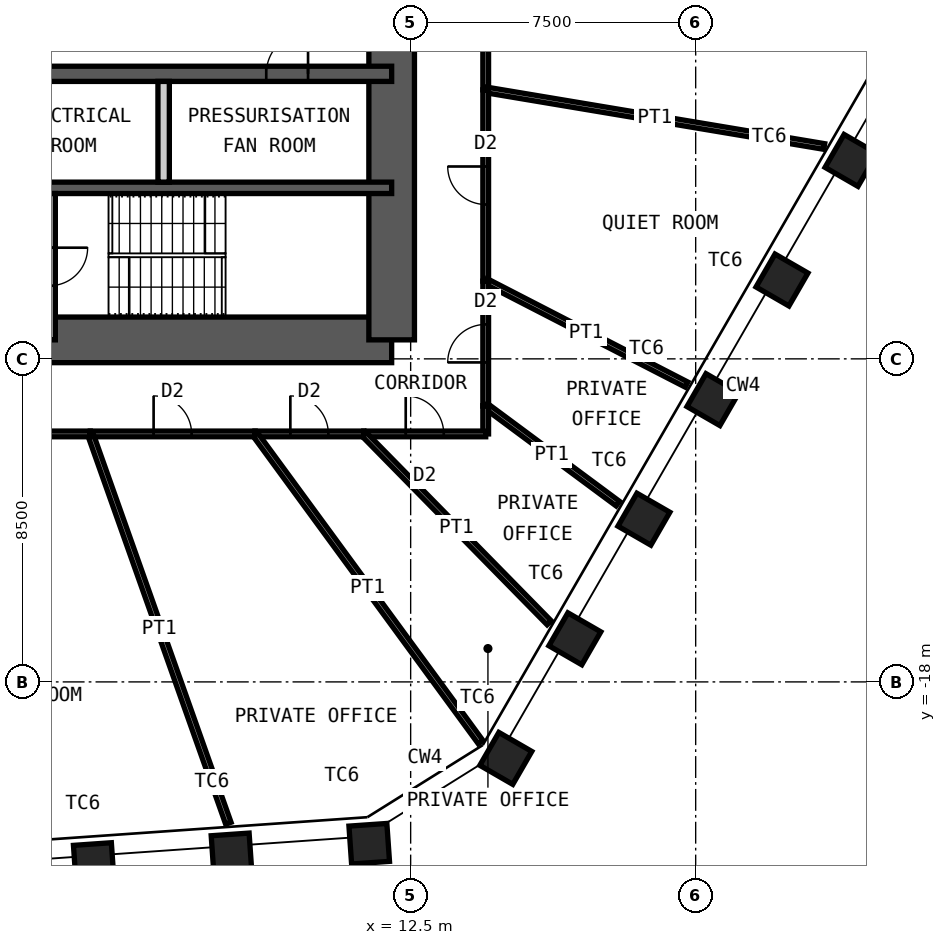
"""IFC4 building model, lengths in metres.
Left out: names, types, materials, properties, quantities, classifications, styles, units other than length and angle.
Written with IfcOpenShell. Run it as: python <this file> out.ifc"""

import sys

from ifc_helpers import new_model, si_unit, direction, frame, frame_2d, origin, origin_2d, place, context, subcontext, project, spatial, rectangle, hollow_rectangle, extrude, element, fill, save


model = new_model("IFC4")
c1 = context("Model", 3, precision=1e-05, world=origin(), true_north=direction((0.0, 1.0)))
c2 = subcontext(c1, "Body", "Model", "MODEL_VIEW")
j1 = project(units=[si_unit("LENGTHUNIT", "METRE"), si_unit("PLANEANGLEUNIT", "RADIAN")], contexts=[c1])
p1 = place(None, origin())
s1 = spatial("IfcSite", under=j1, at=p1, CompositionType="ELEMENT")
p2 = place(p1, origin())
s2 = spatial("IfcBuilding", under=s1, at=p2, CompositionType="ELEMENT")
p3 = place(p2, frame((0.0, 0.0, 243.4)))
s3 = spatial("IfcBuildingStorey", under=s2, at=p3, CompositionType="ELEMENT", Elevation=243.4)
for number, where, z_axis, x_axis in (
    (1, (24.088, -4.279, 0.0), (0.0, 0.0, 1.0), (0.5, 0.866, 0.0)),
    (2, (22.271, -7.426, 0.0), (0.0, 0.0, 1.0), (0.5, 0.866, 0.0)),
    (3, (20.454, -10.572, 0.0), (0.0, 0.0, 1.0), (0.5, 0.866, 0.0)),
    (4, (18.637, -13.719, 0.0), (0.0, 0.0, 1.0), (0.5, 0.866, 0.0)),
    (5, (16.821, -16.866, 0.0), (0.0, 0.0, 1.0), (0.5, 0.866, 0.0)),
    (6, (15.004, -20.012, 0.0), (0.0, 0.0, 1.0), (0.5, 0.866, 0.0)),
    (7, (11.41, -22.258, 0.0), (0.0, 0.0, 1.0), (0.998, 0.07, 0.0)),
    (8, (7.785, -22.512, 0.0), (0.0, 0.0, 1.0), (0.998, 0.07, 0.0)),
    (9, (4.16, -22.765, 0.0), (0.0, 0.0, 1.0), (0.998, 0.07, 0.0)),
):
    element("IfcColumn", number, at=place(p3, frame(where, z_axis=z_axis, x_axis=x_axis)), inside=s3, PredefinedType="COLUMN", context=c2, shape_type="SweptSolid", body=[
        extrude(hollow_rectangle(XDim=1.0, YDim=1.0, WallThickness=0.06, at=origin_2d()), origin(), (0.0, 0.0, 1.0), 4.2),
    ])
p4 = place(p3, frame((-12.0, -9.0, 0.0), z_axis=(0.0, 0.0, 1.0), x_axis=(1.0, 0.0, 0.0)))
e10 = element("IfcWall", 10, at=p4, inside=s3, PredefinedType="SHEAR", context=c2, shape_type="SweptSolid", body=[
    extrude(rectangle(XDim=24.0, YDim=1.2, at=frame_2d((12.0, 0.0))), origin(), (0.0, 0.0, 1.0), 4.2),
])
p5 = place(p4, frame((1.35, 0.0, 0.0)))
e11 = element("IfcOpeningElement", 11, at=p5, cuts=e10, PredefinedType="OPENING", context=c2, shape_type="SweptSolid", body=[
    extrude(rectangle(XDim=1.0, YDim=2.1, at=frame_2d((0.5, 1.05))), frame((0.0, 0.61, 0.0), z_axis=(0.0, -1.0, 0.0), x_axis=(1.0, 0.0, 0.0)), (0.0, 0.0, 1.0), 1.22),
])
p6 = place(p4, frame((5.325, 0.0, 0.0)))
e12 = element("IfcOpeningElement", 12, at=p6, cuts=e10, PredefinedType="OPENING", context=c2, shape_type="SweptSolid", body=[
    extrude(rectangle(XDim=1.15, YDim=2.1, at=frame_2d((0.575, 1.05))), frame((0.0, 0.61, 0.0), z_axis=(0.0, -1.0, 0.0), x_axis=(1.0, 0.0, 0.0)), (0.0, 0.0, 1.0), 1.22),
])
p7 = place(p4, frame((12.6, 0.0, 0.0)))
e13 = element("IfcOpeningElement", 13, at=p7, cuts=e10, PredefinedType="OPENING", context=c2, shape_type="SweptSolid", body=[
    extrude(rectangle(XDim=1.0, YDim=2.1, at=frame_2d((0.5, 1.05))), frame((0.0, 0.61, 0.0), z_axis=(0.0, -1.0, 0.0), x_axis=(1.0, 0.0, 0.0)), (0.0, 0.0, 1.0), 1.22),
])
p8 = place(p3, frame((12.0, -9.0, 0.0), z_axis=(0.0, 0.0, 1.0), x_axis=(0.0, 1.0, 0.0)))
e14 = element("IfcWall", 14, at=p8, inside=s3, PredefinedType="SHEAR", context=c2, shape_type="SweptSolid", body=[
    extrude(rectangle(XDim=18.0, YDim=1.2, at=frame_2d((9.0, 0.0))), origin(), (0.0, 0.0, 1.0), 4.2),
])
p9 = place(p8, frame((8.1, 0.0, 0.0)))
e15 = element("IfcOpeningElement", 15, at=p9, cuts=e14, PredefinedType="OPENING", context=c2, shape_type="SweptSolid", body=[
    extrude(rectangle(XDim=1.8, YDim=2.1, at=frame_2d((0.9, 1.05))), frame((0.0, 0.61, 0.0), z_axis=(0.0, -1.0, 0.0), x_axis=(1.0, 0.0, 0.0)), (0.0, 0.0, 1.0), 1.22),
])
p10 = place(p3, frame((-12.0, -2.0, 0.0), z_axis=(0.0, 0.0, 1.0), x_axis=(1.0, 0.0, 0.0)))
e16 = element("IfcWall", 16, at=p10, inside=s3, PredefinedType="SHEAR", context=c2, shape_type="SweptSolid", body=[
    extrude(rectangle(XDim=24.0, YDim=0.4, at=frame_2d((12.0, 0.0))), origin(), (0.0, 0.0, 1.0), 4.2),
])
p11 = place(p10, frame((1.1, 0.0, 0.0)))
e17 = element("IfcOpeningElement", 17, at=p11, cuts=e16, PredefinedType="OPENING", context=c2, shape_type="SweptSolid", body=[
    extrude(rectangle(XDim=1.1, YDim=2.1, at=frame_2d((0.55, 1.05))), frame((0.0, 0.21, 0.0), z_axis=(0.0, -1.0, 0.0), x_axis=(1.0, 0.0, 0.0)), (0.0, 0.0, 1.0), 0.42),
])
p12 = place(p10, frame((13.55, 0.0, 0.0)))
e18 = element("IfcOpeningElement", 18, at=p12, cuts=e16, PredefinedType="OPENING", context=c2, shape_type="SweptSolid", body=[
    extrude(rectangle(XDim=1.1, YDim=2.1, at=frame_2d((0.55, 1.05))), frame((0.0, 0.21, 0.0), z_axis=(0.0, -1.0, 0.0), x_axis=(1.0, 0.0, 0.0)), (0.0, 0.0, 1.0), 0.42),
])
p13 = place(p10, frame((20.7, 0.0, 0.0)))
e19 = element("IfcOpeningElement", 19, at=p13, cuts=e16, PredefinedType="OPENING", context=c2, shape_type="SweptSolid", body=[
    extrude(rectangle(XDim=1.1, YDim=2.1, at=frame_2d((0.55, 1.05))), frame((0.0, 0.21, 0.0), z_axis=(0.0, -1.0, 0.0), x_axis=(1.0, 0.0, 0.0)), (0.0, 0.0, 1.0), 0.42),
])
p14 = place(p10, frame((4.0, 0.0, 0.0)))
e20 = element("IfcOpeningElement", 20, at=p14, cuts=e16, PredefinedType="OPENING", context=c2, shape_type="SweptSolid", body=[
    extrude(rectangle(XDim=1.0, YDim=2.1, at=frame_2d((0.5, 1.05))), frame((0.0, 0.21, 0.0), z_axis=(0.0, -1.0, 0.0), x_axis=(1.0, 0.0, 0.0)), (0.0, 0.0, 1.0), 0.42),
])
p15 = place(p10, frame((6.8, 0.0, 0.0)))
e21 = element("IfcOpeningElement", 21, at=p15, cuts=e16, PredefinedType="OPENING", context=c2, shape_type="SweptSolid", body=[
    extrude(rectangle(XDim=1.0, YDim=2.1, at=frame_2d((0.5, 1.05))), frame((0.0, 0.21, 0.0), z_axis=(0.0, -1.0, 0.0), x_axis=(1.0, 0.0, 0.0)), (0.0, 0.0, 1.0), 0.42),
])
p16 = place(p3, frame((-12.0, -5.0, 0.0), z_axis=(0.0, 0.0, 1.0), x_axis=(1.0, 0.0, 0.0)))
e22 = element("IfcWall", 22, at=p16, inside=s3, PredefinedType="SHEAR", context=c2, shape_type="SweptSolid", body=[
    extrude(rectangle(XDim=24.0, YDim=0.3, at=frame_2d((12.0, 0.0))), origin(), (0.0, 0.0, 1.0), 4.2),
])
p17 = place(p3, frame((6.0, -4.85, 0.0), z_axis=(0.0, 0.0, 1.0), x_axis=(0.0, 1.0, 0.0)))
e23 = element("IfcWall", 23, at=p17, inside=s3, PredefinedType="PARTITIONING", context=c2, shape_type="SweptSolid", body=[
    extrude(rectangle(XDim=2.65, YDim=0.3, at=frame_2d((1.325, 0.0))), origin(), (0.0, 0.0, 1.0), 3.98),
])
p18 = place(p3, frame((3.0, -9.0, 0.0), z_axis=(0.0, 0.0, 1.0), x_axis=(0.0, 1.0, 0.0)))
e24 = element("IfcWall", 24, at=p18, inside=s3, PredefinedType="PARTITIONING", context=c2, shape_type="SweptSolid", body=[
    extrude(rectangle(XDim=3.85, YDim=0.3, at=frame_2d((1.925, 0.0))), origin(), (0.0, 0.0, 1.0), 3.98),
])
p19 = place(p18, frame((1.425, 0.0, 0.0)))
e25 = element("IfcOpeningElement", 25, at=p19, cuts=e24, PredefinedType="OPENING", context=c2, shape_type="SweptSolid", body=[
    extrude(rectangle(XDim=1.0, YDim=2.1, at=frame_2d((0.5, 1.05))), frame((0.0, 0.16, 0.0), z_axis=(0.0, -1.0, 0.0), x_axis=(1.0, 0.0, 0.0)), (0.0, 0.0, 1.0), 0.32),
])
p20 = place(p3, frame((14.475, 3.475, 0.0), z_axis=(0.0, 0.0, 1.0), x_axis=(0.0, -1.0, 0.0)))
e26 = element("IfcWall", 26, at=p20, inside=s3, PredefinedType="PARTITIONING", context=c2, shape_type="SweptSolid", body=[
    extrude(rectangle(XDim=5.896, YDim=0.15, at=frame_2d((2.948, 0.0))), origin(), (0.0, 0.0, 1.0), 4.03),
])
p21 = place(p20, frame((2.448, 0.0, 0.0)))
e27 = element("IfcOpeningElement", 27, at=p21, cuts=e26, PredefinedType="OPENING", context=c2, shape_type="SweptSolid", body=[
    extrude(rectangle(XDim=1.0, YDim=2.4, at=frame_2d((0.5, 1.2))), frame((0.0, 0.085, 0.0), z_axis=(0.0, -1.0, 0.0), x_axis=(1.0, 0.0, 0.0)), (0.0, 0.0, 1.0), 0.17),
])
p22 = place(p3, frame((23.383, -3.912, 0.0), z_axis=(0.0, 0.0, 1.0), x_axis=(-0.986293651891, 0.164999491631, 0.0)))
e28 = element("IfcWall", 28, at=p22, inside=s3, PredefinedType="PARTITIONING", context=c2, shape_type="SweptSolid", body=[
    extrude(rectangle(XDim=9.032, YDim=0.15, at=frame_2d((4.516, 0.0))), origin(), (0.0, 0.0, 1.0), 3.43),
])
p23 = place(p3, frame((14.475, -2.422, 0.0), z_axis=(0.0, 0.0, 1.0), x_axis=(0.0, -1.0, 0.0)))
e29 = element("IfcWall", 29, at=p23, inside=s3, PredefinedType="PARTITIONING", context=c2, shape_type="SweptSolid", body=[
    extrude(rectangle(XDim=5.033, YDim=0.15, at=frame_2d((2.517, 0.0))), origin(), (0.0, 0.0, 1.0), 4.03),
])
p24 = place(p23, frame((2.017, 0.0, 0.0)))
e30 = element("IfcOpeningElement", 30, at=p24, cuts=e29, PredefinedType="OPENING", context=c2, shape_type="SweptSolid", body=[
    extrude(rectangle(XDim=1.0, YDim=2.4, at=frame_2d((0.5, 1.2))), frame((0.0, 0.085, 0.0), z_axis=(0.0, -1.0, 0.0), x_axis=(1.0, 0.0, 0.0)), (0.0, 0.0, 1.0), 0.17),
])
p25 = place(p3, frame((19.759, -10.177, 0.0), z_axis=(0.0, 0.0, 1.0), x_axis=(-0.889015092721, 0.457877893017, 0.0)))
e31 = element("IfcWall", 31, at=p25, inside=s3, PredefinedType="PARTITIONING", context=c2, shape_type="SweptSolid", body=[
    extrude(rectangle(XDim=5.944, YDim=0.15, at=frame_2d((2.972, 0.0))), origin(), (0.0, 0.0, 1.0), 3.43),
])
p26 = place(p3, frame((14.475, -7.455, 0.0), z_axis=(0.0, 0.0, 1.0), x_axis=(0.0, -1.0, 0.0)))
e32 = element("IfcWall", 32, at=p26, inside=s3, PredefinedType="PARTITIONING", context=c2, shape_type="SweptSolid", body=[
    extrude(rectangle(XDim=3.277, YDim=0.15, at=frame_2d((1.639, 0.0))), origin(), (0.0, 0.0, 1.0), 4.03),
])
p27 = place(p26, frame((1.139, 0.0, 0.0)))
e33 = element("IfcOpeningElement", 33, at=p27, cuts=e32, PredefinedType="OPENING", context=c2, shape_type="SweptSolid", body=[
    extrude(rectangle(XDim=1.0, YDim=2.4, at=frame_2d((0.5, 1.2))), frame((0.0, 0.085, 0.0), z_axis=(0.0, -1.0, 0.0), x_axis=(1.0, 0.0, 0.0)), (0.0, 0.0, 1.0), 0.17),
])
p28 = place(p3, frame((17.951, -13.309, 0.0), z_axis=(0.0, 0.0, 1.0), x_axis=(-0.803285242674, 0.595594508791, 0.0)))
e34 = element("IfcWall", 34, at=p28, inside=s3, PredefinedType="PARTITIONING", context=c2, shape_type="SweptSolid", body=[
    extrude(rectangle(XDim=4.327, YDim=0.15, at=frame_2d((2.164, 0.0))), origin(), (0.0, 0.0, 1.0), 3.43),
])
p29 = place(p3, frame((14.475, -10.732, 0.0), z_axis=(0.0, 0.0, 1.0), x_axis=(0.0, -1.0, 0.0)))
e35 = element("IfcWall", 35, at=p29, inside=s3, PredefinedType="PARTITIONING", context=c2, shape_type="SweptSolid", body=[
    extrude(rectangle(XDim=0.743, YDim=0.15, at=frame_2d((0.372, 0.0))), origin(), (0.0, 0.0, 1.0), 4.03),
])
p30 = place(p3, frame((14.475, -11.475, 0.0), z_axis=(0.0, 0.0, 1.0), x_axis=(-1.0, 0.0, 0.0)))
e36 = element("IfcWall", 36, at=p30, inside=s3, PredefinedType="PARTITIONING", context=c2, shape_type="SweptSolid", body=[
    extrude(rectangle(XDim=3.209, YDim=0.15, at=frame_2d((1.605, 0.0))), origin(), (0.0, 0.0, 1.0), 4.03),
])
p31 = place(p30, frame((1.105, 0.0, 0.0)))
e37 = element("IfcOpeningElement", 37, at=p31, cuts=e36, PredefinedType="OPENING", context=c2, shape_type="SweptSolid", body=[
    extrude(rectangle(XDim=1.0, YDim=2.4, at=frame_2d((0.5, 1.2))), frame((0.0, 0.085, 0.0), z_axis=(0.0, -1.0, 0.0), x_axis=(1.0, 0.0, 0.0)), (0.0, 0.0, 1.0), 0.17),
])
p32 = place(p3, frame((16.145, -16.444, 0.0), z_axis=(0.0, 0.0, 1.0), x_axis=(-0.700591378209, 0.71356269576, 0.0)))
e38 = element("IfcWall", 38, at=p32, inside=s3, PredefinedType="PARTITIONING", context=c2, shape_type="SweptSolid", body=[
    extrude(rectangle(XDim=6.964, YDim=0.15, at=frame_2d((3.482, 0.0))), origin(), (0.0, 0.0, 1.0), 3.43),
])
p33 = place(p3, frame((11.266, -11.475, 0.0), z_axis=(0.0, 0.0, 1.0), x_axis=(-1.0, 0.0, 0.0)))
e39 = element("IfcWall", 39, at=p33, inside=s3, PredefinedType="PARTITIONING", context=c2, shape_type="SweptSolid", body=[
    extrude(rectangle(XDim=2.863, YDim=0.15, at=frame_2d((1.432, 0.0))), origin(), (0.0, 0.0, 1.0), 4.03),
])
p34 = place(p33, frame((0.932, 0.0, 0.0)))
e40 = element("IfcOpeningElement", 40, at=p34, cuts=e39, PredefinedType="OPENING", context=c2, shape_type="SweptSolid", body=[
    extrude(rectangle(XDim=1.0, YDim=2.4, at=frame_2d((0.5, 1.2))), frame((0.0, 0.085, 0.0), z_axis=(0.0, -1.0, 0.0), x_axis=(1.0, 0.0, 0.0)), (0.0, 0.0, 1.0), 0.17),
])
p35 = place(p3, frame((14.339, -19.582, 0.0), z_axis=(0.0, 0.0, 1.0), x_axis=(-0.590789413226, 0.806825798559, 0.0)))
e41 = element("IfcWall", 41, at=p35, inside=s3, PredefinedType="PARTITIONING", context=c2, shape_type="SweptSolid", body=[
    extrude(rectangle(XDim=10.048, YDim=0.15, at=frame_2d((5.024, 0.0))), origin(), (0.0, 0.0, 1.0), 2.93),
])
p36 = place(p3, frame((8.403, -11.475, 0.0), z_axis=(0.0, 0.0, 1.0), x_axis=(-1.0, 0.0, 0.0)))
e42 = element("IfcWall", 42, at=p36, inside=s3, PredefinedType="PARTITIONING", context=c2, shape_type="SweptSolid", body=[
    extrude(rectangle(XDim=4.333, YDim=0.15, at=frame_2d((2.167, 0.0))), origin(), (0.0, 0.0, 1.0), 4.03),
])
p37 = place(p36, frame((1.667, 0.0, 0.0)))
e43 = element("IfcOpeningElement", 43, at=p37, cuts=e42, PredefinedType="OPENING", context=c2, shape_type="SweptSolid", body=[
    extrude(rectangle(XDim=1.0, YDim=2.4, at=frame_2d((0.5, 1.2))), frame((0.0, 0.085, 0.0), z_axis=(0.0, -1.0, 0.0), x_axis=(1.0, 0.0, 0.0)), (0.0, 0.0, 1.0), 0.17),
])
p38 = place(p3, frame((7.703, -21.719, 0.0), z_axis=(0.0, 0.0, 1.0), x_axis=(-0.334269551553, 0.942477515331, 0.0)))
e44 = element("IfcWall", 44, at=p38, inside=s3, PredefinedType="PARTITIONING", context=c2, shape_type="SweptSolid", body=[
    extrude(rectangle(XDim=10.869, YDim=0.15, at=frame_2d((5.435, 0.0))), origin(), (0.0, 0.0, 1.0), 3.43),
])
p39 = place(p3, frame((4.07, -11.475, 0.0), z_axis=(0.0, 0.0, 1.0), x_axis=(-1.0, 0.0, 0.0)))
e45 = element("IfcWall", 45, at=p39, inside=s3, PredefinedType="PARTITIONING", context=c2, shape_type="SweptSolid", body=[
    extrude(rectangle(XDim=5.665, YDim=0.15, at=frame_2d((2.832, 0.0))), origin(), (0.0, 0.0, 1.0), 4.03),
])
p40 = place(p39, frame((1.932, 0.0, 0.0)))
e46 = element("IfcOpeningElement", 46, at=p40, cuts=e45, PredefinedType="OPENING", context=c2, shape_type="SweptSolid", body=[
    extrude(rectangle(XDim=1.8, YDim=2.4, at=frame_2d((0.9, 1.2))), frame((0.0, 0.085, 0.0), z_axis=(0.0, -1.0, 0.0), x_axis=(1.0, 0.0, 0.0)), (0.0, 0.0, 1.0), 0.17),
])
p41 = place(p13, origin())
e47 = element("IfcDoor", 47, at=p41, inside=s3, OperationType="SINGLE_SWING_LEFT", PredefinedType="DOOR", context=c2, shape_type="SweptSolid", body=[
    extrude(rectangle(XDim=1.1, YDim=2.1, at=frame_2d((0.55, 1.05))), frame((0.0, 0.025, 0.0), z_axis=(0.0, -1.0, 0.0), x_axis=(1.0, 0.0, 0.0)), (0.0, 0.0, 1.0), 0.05),
])
fill(e19, e47)
p42 = place(p24, origin())
e48 = element("IfcDoor", 48, at=p42, inside=s3, OperationType="SINGLE_SWING_LEFT", PredefinedType="DOOR", context=c2, shape_type="SweptSolid", body=[
    extrude(rectangle(XDim=1.0, YDim=2.4, at=frame_2d((0.5, 1.2))), frame((0.0, 0.025, 0.0), z_axis=(0.0, -1.0, 0.0), x_axis=(1.0, 0.0, 0.0)), (0.0, 0.0, 1.0), 0.05),
])
fill(e30, e48)
p43 = place(p27, origin())
e49 = element("IfcDoor", 49, at=p43, inside=s3, OperationType="SINGLE_SWING_RIGHT", PredefinedType="DOOR", context=c2, shape_type="SweptSolid", body=[
    extrude(rectangle(XDim=1.0, YDim=2.4, at=frame_2d((0.5, 1.2))), frame((0.0, 0.025, 0.0), z_axis=(0.0, -1.0, 0.0), x_axis=(1.0, 0.0, 0.0)), (0.0, 0.0, 1.0), 0.05),
])
fill(e33, e49)
p44 = place(p31, origin())
e50 = element("IfcDoor", 50, at=p44, inside=s3, OperationType="SINGLE_SWING_RIGHT", PredefinedType="DOOR", context=c2, shape_type="SweptSolid", body=[
    extrude(rectangle(XDim=1.0, YDim=2.4, at=frame_2d((0.5, 1.2))), frame((0.0, 0.025, 0.0), z_axis=(0.0, -1.0, 0.0), x_axis=(1.0, 0.0, 0.0)), (0.0, 0.0, 1.0), 0.05),
])
fill(e37, e50)
p45 = place(p34, origin())
e51 = element("IfcDoor", 51, at=p45, inside=s3, OperationType="SINGLE_SWING_RIGHT", PredefinedType="DOOR", context=c2, shape_type="SweptSolid", body=[
    extrude(rectangle(XDim=1.0, YDim=2.4, at=frame_2d((0.5, 1.2))), frame((0.0, 0.025, 0.0), z_axis=(0.0, -1.0, 0.0), x_axis=(1.0, 0.0, 0.0)), (0.0, 0.0, 1.0), 0.05),
])
fill(e40, e51)
p46 = place(p37, origin())
e52 = element("IfcDoor", 52, at=p46, inside=s3, OperationType="SINGLE_SWING_RIGHT", PredefinedType="DOOR", context=c2, shape_type="SweptSolid", body=[
    extrude(rectangle(XDim=1.0, YDim=2.4, at=frame_2d((0.5, 1.2))), frame((0.0, 0.025, 0.0), z_axis=(0.0, -1.0, 0.0), x_axis=(1.0, 0.0, 0.0)), (0.0, 0.0, 1.0), 0.05),
])
fill(e43, e52)
save(model, sys.argv[1])
